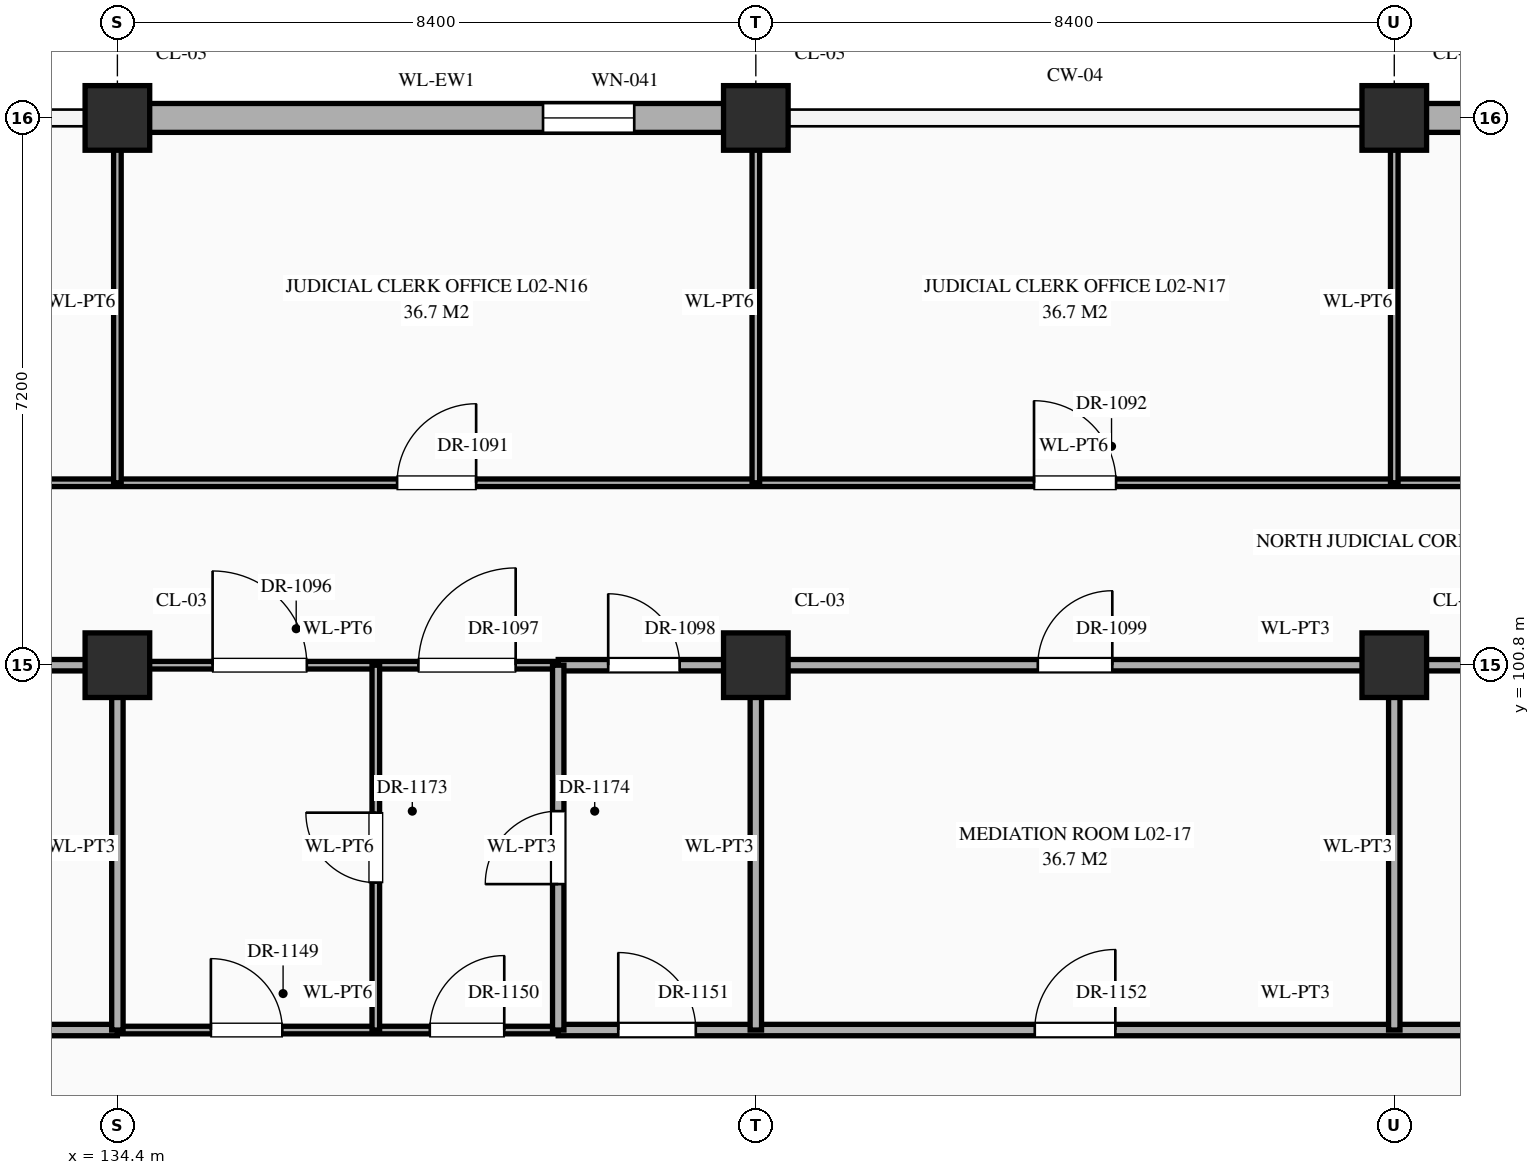
"""IFC4 building model, lengths in metres.
Left out: names, types, materials, properties, quantities, classifications, styles, units other than length and angle.
Written with IfcOpenShell. Run it as: python <this file> out.ifc"""

import sys

from ifc_helpers import new_model, si_unit, direction, frame, frame_2d, origin, origin_2d, place, context, subcontext, project, spatial, rectangle, extrude, element, fill, save


model = new_model("IFC4")
c1 = context("Model", 3, precision=1e-05, world=origin(), true_north=direction((0.0, 1.0)))
c2 = subcontext(c1, "Body", "Model", "MODEL_VIEW")
j1 = project(units=[si_unit("LENGTHUNIT", "METRE"), si_unit("PLANEANGLEUNIT", "RADIAN")], contexts=[c1])
p1 = place(None, origin())
s1 = spatial("IfcSite", under=j1, at=p1, CompositionType="ELEMENT")
p2 = place(p1, origin())
s2 = spatial("IfcBuilding", under=s1, at=p2, CompositionType="ELEMENT")
p3 = place(p2, frame((0.0, 0.0, 5.4)))
s3 = spatial("IfcBuildingStorey", under=s2, at=p3, CompositionType="ELEMENT", Elevation=5.4)
for number, where, z_axis, x_axis in (
    (1, (134.4, 100.8, 0.0), (0.0, 0.0, 1.0), (1.0, 0.0, 0.0)),
    (2, (134.4, 108.0, 0.0), (0.0, 0.0, 1.0), (1.0, 0.0, 0.0)),
    (3, (142.8, 100.8, 0.0), (0.0, 0.0, 1.0), (1.0, 0.0, 0.0)),
    (4, (142.8, 108.0, 0.0), (0.0, 0.0, 1.0), (1.0, 0.0, 0.0)),
    (5, (151.2, 100.8, 0.0), (0.0, 0.0, 1.0), (1.0, 0.0, 0.0)),
    (6, (151.2, 108.0, 0.0), (0.0, 0.0, 1.0), (1.0, 0.0, 0.0)),
):
    element("IfcColumn", number, at=place(p3, frame(where, z_axis=z_axis, x_axis=x_axis)), inside=s3, PredefinedType="COLUMN", context=c2, shape_type="SweptSolid", body=[
        extrude(rectangle(XDim=0.85, YDim=0.85, at=origin_2d()), origin(), (0.0, 0.0, 1.0), 5.4),
    ])
p4 = place(p3, frame((134.82, 108.0, 0.0), z_axis=(0.0, 0.0, 1.0), x_axis=(1.0, 0.0, 0.0)))
e7 = element("IfcWall", 7, at=p4, inside=s3, PredefinedType="STANDARD", context=c2, shape_type="SweptSolid", body=[
    extrude(rectangle(XDim=7.56, YDim=0.38, at=frame_2d((3.78, 0.0))), origin(), (0.0, 0.0, 1.0), 4.47),
])
p5 = place(p4, frame((5.18, 0.0, 0.85)))
e8 = element("IfcOpeningElement", 8, at=p5, cuts=e7, PredefinedType="OPENING", context=c2, shape_type="SweptSolid", body=[
    extrude(rectangle(XDim=1.2, YDim=1.56, at=frame_2d((0.6, 0.78))), frame((0.0, 0.202, 0.0), z_axis=(0.0, -1.0, 0.0), x_axis=(1.0, 0.0, 0.0)), (0.0, 0.0, 1.0), 0.404),
])
p6 = place(p3, frame((151.62, 108.0, 0.0), z_axis=(0.0, 0.0, 1.0), x_axis=(1.0, 0.0, 0.0)))
e9 = element("IfcWall", 9, at=p6, inside=s3, PredefinedType="STANDARD", context=c2, shape_type="SweptSolid", body=[
    extrude(rectangle(XDim=7.56, YDim=0.38, at=frame_2d((3.78, 0.0))), origin(), (0.0, 0.0, 1.0), 4.47),
])
p7 = place(p6, frame((5.18, 0.0, 0.85)))
e10 = element("IfcOpeningElement", 10, at=p7, cuts=e9, PredefinedType="OPENING", context=c2, shape_type="SweptSolid", body=[
    extrude(rectangle(XDim=1.2, YDim=1.92, at=frame_2d((0.6, 0.96))), frame((0.0, 0.202, 0.0), z_axis=(0.0, -1.0, 0.0), x_axis=(1.0, 0.0, 0.0)), (0.0, 0.0, 1.0), 0.404),
])
p8 = place(p3, frame((115.0, 96.0, 0.0), z_axis=(0.0, 0.0, 1.0), x_axis=(1.0, 0.0, 0.0)))
e11 = element("IfcWall", 11, at=p8, inside=s3, PredefinedType="STANDARD", context=c2, shape_type="SweptSolid", body=[
    extrude(rectangle(XDim=19.4, YDim=0.15, at=frame_2d((9.7, 0.0))), origin(), (0.0, 0.0, 1.0), 5.12),
])
p9 = place(p8, frame((0.82, 0.0, 0.0)))
e12 = element("IfcOpeningElement", 12, at=p9, cuts=e11, PredefinedType="OPENING", context=c2, shape_type="SweptSolid", body=[
    extrude(rectangle(XDim=0.96, YDim=2.2, at=frame_2d((0.48, 1.1))), frame((0.0, 0.087, 0.0), z_axis=(0.0, -1.0, 0.0), x_axis=(1.0, 0.0, 0.0)), (0.0, 0.0, 1.0), 0.174),
])
p10 = place(p8, frame((6.18, 0.0, 0.0)))
e13 = element("IfcOpeningElement", 13, at=p10, cuts=e11, PredefinedType="OPENING", context=c2, shape_type="SweptSolid", body=[
    extrude(rectangle(XDim=1.24, YDim=2.3, at=frame_2d((0.62, 1.15))), frame((0.0, 0.087, 0.0), z_axis=(0.0, -1.0, 0.0), x_axis=(1.0, 0.0, 0.0)), (0.0, 0.0, 1.0), 0.174),
])
p11 = place(p8, frame((14.56, 0.0, 0.0)))
e14 = element("IfcOpeningElement", 14, at=p11, cuts=e11, PredefinedType="OPENING", context=c2, shape_type="SweptSolid", body=[
    extrude(rectangle(XDim=1.28, YDim=2.35, at=frame_2d((0.64, 1.175))), frame((0.0, 0.087, 0.0), z_axis=(0.0, -1.0, 0.0), x_axis=(1.0, 0.0, 0.0)), (0.0, 0.0, 1.0), 0.174),
])
p12 = place(p3, frame((134.4, 96.0, 0.0), z_axis=(0.0, 0.0, 1.0), x_axis=(1.0, 0.0, 0.0)))
e15 = element("IfcWall", 15, at=p12, inside=s3, PredefinedType="STANDARD", context=c2, shape_type="SweptSolid", body=[
    extrude(rectangle(XDim=5.8, YDim=0.1, at=frame_2d((2.9, 0.0))), origin(), (0.0, 0.0, 1.0), 5.12),
])
p13 = place(p12, frame((1.23, 0.0, 0.0)))
e16 = element("IfcOpeningElement", 16, at=p13, cuts=e15, PredefinedType="OPENING", context=c2, shape_type="SweptSolid", body=[
    extrude(rectangle(XDim=0.94, YDim=2.3, at=frame_2d((0.47, 1.15))), frame((0.0, 0.062, 0.0), z_axis=(0.0, -1.0, 0.0), x_axis=(1.0, 0.0, 0.0)), (0.0, 0.0, 1.0), 0.124),
])
p14 = place(p12, frame((4.11, 0.0, 0.0)))
e17 = element("IfcOpeningElement", 17, at=p14, cuts=e15, PredefinedType="OPENING", context=c2, shape_type="SweptSolid", body=[
    extrude(rectangle(XDim=0.98, YDim=2.35, at=frame_2d((0.49, 1.175))), frame((0.0, 0.062, 0.0), z_axis=(0.0, -1.0, 0.0), x_axis=(1.0, 0.0, 0.0)), (0.0, 0.0, 1.0), 0.124),
])
p15 = place(p3, frame((140.2, 96.0, 0.0), z_axis=(0.0, 0.0, 1.0), x_axis=(1.0, 0.0, 0.0)))
e18 = element("IfcWall", 18, at=p15, inside=s3, PredefinedType="STANDARD", context=c2, shape_type="SweptSolid", body=[
    extrude(rectangle(XDim=19.4, YDim=0.15, at=frame_2d((9.7, 0.0))), origin(), (0.0, 0.0, 1.0), 5.12),
])
p16 = place(p15, frame((0.79, 0.0, 0.0)))
e19 = element("IfcOpeningElement", 19, at=p16, cuts=e18, PredefinedType="OPENING", context=c2, shape_type="SweptSolid", body=[
    extrude(rectangle(XDim=1.02, YDim=2.4, at=frame_2d((0.51, 1.2))), frame((0.0, 0.087, 0.0), z_axis=(0.0, -1.0, 0.0), x_axis=(1.0, 0.0, 0.0)), (0.0, 0.0, 1.0), 0.174),
])
p17 = place(p15, frame((6.27, 0.0, 0.0)))
e20 = element("IfcOpeningElement", 20, at=p17, cuts=e18, PredefinedType="OPENING", context=c2, shape_type="SweptSolid", body=[
    extrude(rectangle(XDim=1.06, YDim=2.4, at=frame_2d((0.53, 1.2))), frame((0.0, 0.087, 0.0), z_axis=(0.0, -1.0, 0.0), x_axis=(1.0, 0.0, 0.0)), (0.0, 0.0, 1.0), 0.174),
])
p18 = place(p15, frame((14.63, 0.0, 0.0)))
e21 = element("IfcOpeningElement", 21, at=p18, cuts=e18, PredefinedType="OPENING", context=c2, shape_type="SweptSolid", body=[
    extrude(rectangle(XDim=1.14, YDim=2.4, at=frame_2d((0.57, 1.2))), frame((0.0, 0.087, 0.0), z_axis=(0.0, -1.0, 0.0), x_axis=(1.0, 0.0, 0.0)), (0.0, 0.0, 1.0), 0.174),
])
p19 = place(p3, frame((126.0, 100.8, 0.0), z_axis=(0.0, 0.0, 1.0), x_axis=(1.0, 0.0, 0.0)))
e22 = element("IfcWall", 22, at=p19, inside=s3, PredefinedType="STANDARD", context=c2, shape_type="SweptSolid", body=[
    extrude(rectangle(XDim=8.4, YDim=0.15, at=frame_2d((4.2, 0.0))), origin(), (0.0, 0.0, 1.0), 4.27),
])
p20 = place(p19, frame((3.6, 0.0, 0.0)))
e23 = element("IfcOpeningElement", 23, at=p20, cuts=e22, PredefinedType="OPENING", context=c2, shape_type="SweptSolid", body=[
    extrude(rectangle(XDim=1.2, YDim=2.35, at=frame_2d((0.6, 1.175))), frame((0.0, 0.087, 0.0), z_axis=(0.0, -1.0, 0.0), x_axis=(1.0, 0.0, 0.0)), (0.0, 0.0, 1.0), 0.174),
])
p21 = place(p3, frame((134.4, 100.8, 0.0), z_axis=(0.0, 0.0, 1.0), x_axis=(1.0, 0.0, 0.0)))
e24 = element("IfcWall", 24, at=p21, inside=s3, PredefinedType="STANDARD", context=c2, shape_type="SweptSolid", body=[
    extrude(rectangle(XDim=5.8, YDim=0.1, at=frame_2d((2.9, 0.0))), origin(), (0.0, 0.0, 1.0), 4.27),
])
p22 = place(p21, frame((1.252, 0.0, 0.0)))
e25 = element("IfcOpeningElement", 25, at=p22, cuts=e24, PredefinedType="OPENING", context=c2, shape_type="SweptSolid", body=[
    extrude(rectangle(XDim=1.24, YDim=2.3, at=frame_2d((0.62, 1.15))), frame((0.0, 0.062, 0.0), z_axis=(0.0, -1.0, 0.0), x_axis=(1.0, 0.0, 0.0)), (0.0, 0.0, 1.0), 0.124),
])
p23 = place(p21, frame((3.96, 0.0, 0.0)))
e26 = element("IfcOpeningElement", 26, at=p23, cuts=e24, PredefinedType="OPENING", context=c2, shape_type="SweptSolid", body=[
    extrude(rectangle(XDim=1.28, YDim=2.35, at=frame_2d((0.64, 1.175))), frame((0.0, 0.062, 0.0), z_axis=(0.0, -1.0, 0.0), x_axis=(1.0, 0.0, 0.0)), (0.0, 0.0, 1.0), 0.124),
])
p24 = place(p3, frame((140.2, 100.8, 0.0), z_axis=(0.0, 0.0, 1.0), x_axis=(1.0, 0.0, 0.0)))
e27 = element("IfcWall", 27, at=p24, inside=s3, PredefinedType="STANDARD", context=c2, shape_type="SweptSolid", body=[
    extrude(rectangle(XDim=19.4, YDim=0.15, at=frame_2d((9.7, 0.0))), origin(), (0.0, 0.0, 1.0), 4.27),
])
p25 = place(p24, frame((0.657, 0.0, 0.0)))
e28 = element("IfcOpeningElement", 28, at=p25, cuts=e27, PredefinedType="OPENING", context=c2, shape_type="SweptSolid", body=[
    extrude(rectangle(XDim=0.94, YDim=2.3, at=frame_2d((0.47, 1.15))), frame((0.0, 0.087, 0.0), z_axis=(0.0, -1.0, 0.0), x_axis=(1.0, 0.0, 0.0)), (0.0, 0.0, 1.0), 0.174),
])
p26 = place(p24, frame((6.31, 0.0, 0.0)))
e29 = element("IfcOpeningElement", 29, at=p26, cuts=e27, PredefinedType="OPENING", context=c2, shape_type="SweptSolid", body=[
    extrude(rectangle(XDim=0.98, YDim=2.35, at=frame_2d((0.49, 1.175))), frame((0.0, 0.087, 0.0), z_axis=(0.0, -1.0, 0.0), x_axis=(1.0, 0.0, 0.0)), (0.0, 0.0, 1.0), 0.174),
])
p27 = place(p24, frame((14.69, 0.0, 0.0)))
e30 = element("IfcOpeningElement", 30, at=p27, cuts=e27, PredefinedType="OPENING", context=c2, shape_type="SweptSolid", body=[
    extrude(rectangle(XDim=1.02, YDim=2.4, at=frame_2d((0.51, 1.2))), frame((0.0, 0.087, 0.0), z_axis=(0.0, -1.0, 0.0), x_axis=(1.0, 0.0, 0.0)), (0.0, 0.0, 1.0), 0.174),
])
p28 = place(p3, frame((126.0, 103.2, 0.0), z_axis=(0.0, 0.0, 1.0), x_axis=(1.0, 0.0, 0.0)))
e31 = element("IfcWall", 31, at=p28, inside=s3, PredefinedType="STANDARD", context=c2, shape_type="SweptSolid", body=[
    extrude(rectangle(XDim=41.96, YDim=0.1, at=frame_2d((20.98, 0.0))), origin(), (0.0, 0.0, 1.0), 5.12),
])
p29 = place(p28, frame((3.7, 0.0, 0.0)))
e32 = element("IfcOpeningElement", 32, at=p29, cuts=e31, PredefinedType="OPENING", context=c2, shape_type="SweptSolid", body=[
    extrude(rectangle(XDim=1.0, YDim=2.25, at=frame_2d((0.5, 1.125))), frame((0.0, 0.062, 0.0), z_axis=(0.0, -1.0, 0.0), x_axis=(1.0, 0.0, 0.0)), (0.0, 0.0, 1.0), 0.124),
])
p30 = place(p28, frame((12.08, 0.0, 0.0)))
e33 = element("IfcOpeningElement", 33, at=p30, cuts=e31, PredefinedType="OPENING", context=c2, shape_type="SweptSolid", body=[
    extrude(rectangle(XDim=1.04, YDim=2.2, at=frame_2d((0.52, 1.1))), frame((0.0, 0.062, 0.0), z_axis=(0.0, -1.0, 0.0), x_axis=(1.0, 0.0, 0.0)), (0.0, 0.0, 1.0), 0.124),
])
p31 = place(p28, frame((20.46, 0.0, 0.0)))
e34 = element("IfcOpeningElement", 34, at=p31, cuts=e31, PredefinedType="OPENING", context=c2, shape_type="SweptSolid", body=[
    extrude(rectangle(XDim=1.08, YDim=2.25, at=frame_2d((0.54, 1.125))), frame((0.0, 0.062, 0.0), z_axis=(0.0, -1.0, 0.0), x_axis=(1.0, 0.0, 0.0)), (0.0, 0.0, 1.0), 0.124),
])
p32 = place(p28, frame((28.84, 0.0, 0.0)))
e35 = element("IfcOpeningElement", 35, at=p32, cuts=e31, PredefinedType="OPENING", context=c2, shape_type="SweptSolid", body=[
    extrude(rectangle(XDim=1.12, YDim=2.25, at=frame_2d((0.56, 1.125))), frame((0.0, 0.062, 0.0), z_axis=(0.0, -1.0, 0.0), x_axis=(1.0, 0.0, 0.0)), (0.0, 0.0, 1.0), 0.124),
])
p33 = place(p28, frame((37.2, 0.0, 0.0)))
e36 = element("IfcOpeningElement", 36, at=p33, cuts=e31, PredefinedType="OPENING", context=c2, shape_type="SweptSolid", body=[
    extrude(rectangle(XDim=1.16, YDim=2.3, at=frame_2d((0.58, 1.15))), frame((0.0, 0.062, 0.0), z_axis=(0.0, -1.0, 0.0), x_axis=(1.0, 0.0, 0.0)), (0.0, 0.0, 1.0), 0.124),
])
p34 = place(p3, frame((134.4, 96.0, 0.0), z_axis=(0.0, 0.0, 1.0), x_axis=(0.0, 1.0, 0.0)))
e37 = element("IfcWall", 37, at=p34, inside=s3, PredefinedType="STANDARD", context=c2, shape_type="SweptSolid", body=[
    extrude(rectangle(XDim=4.8, YDim=0.15, at=frame_2d((2.4, 0.0))), origin(), (0.0, 0.0, 1.0), 4.37),
])
p35 = place(p3, frame((134.4, 103.2, 0.0), z_axis=(0.0, 0.0, 1.0), x_axis=(0.0, 1.0, 0.0)))
e38 = element("IfcWall", 38, at=p35, inside=s3, PredefinedType="STANDARD", context=c2, shape_type="SweptSolid", body=[
    extrude(rectangle(XDim=4.76, YDim=0.1, at=frame_2d((2.38, 0.0))), origin(), (0.0, 0.0, 1.0), 4.37),
])
p36 = place(p3, frame((137.8, 96.0, 0.0), z_axis=(0.0, 0.0, 1.0), x_axis=(0.0, 1.0, 0.0)))
e39 = element("IfcWall", 39, at=p36, inside=s3, PredefinedType="STANDARD", context=c2, shape_type="SweptSolid", body=[
    extrude(rectangle(XDim=4.8, YDim=0.1, at=frame_2d((2.4, 0.0))), origin(), (0.0, 0.0, 1.0), 5.12),
])
p37 = place(p36, frame((1.94, 0.0, 0.0)))
e40 = element("IfcOpeningElement", 40, at=p37, cuts=e39, PredefinedType="OPENING", context=c2, shape_type="SweptSolid", body=[
    extrude(rectangle(XDim=0.92, YDim=2.15, at=frame_2d((0.46, 1.075))), frame((0.0, 0.062, 0.0), z_axis=(0.0, -1.0, 0.0), x_axis=(1.0, 0.0, 0.0)), (0.0, 0.0, 1.0), 0.124),
])
p38 = place(p3, frame((140.2, 96.0, 0.0), z_axis=(0.0, 0.0, 1.0), x_axis=(0.0, 1.0, 0.0)))
e41 = element("IfcWall", 41, at=p38, inside=s3, PredefinedType="STANDARD", context=c2, shape_type="SweptSolid", body=[
    extrude(rectangle(XDim=4.8, YDim=0.15, at=frame_2d((2.4, 0.0))), origin(), (0.0, 0.0, 1.0), 5.12),
])
p39 = place(p38, frame((1.92, 0.0, 0.0)))
e42 = element("IfcOpeningElement", 42, at=p39, cuts=e41, PredefinedType="OPENING", context=c2, shape_type="SweptSolid", body=[
    extrude(rectangle(XDim=0.96, YDim=2.2, at=frame_2d((0.48, 1.1))), frame((0.0, 0.087, 0.0), z_axis=(0.0, -1.0, 0.0), x_axis=(1.0, 0.0, 0.0)), (0.0, 0.0, 1.0), 0.174),
])
p40 = place(p3, frame((142.8, 96.0, 0.0), z_axis=(0.0, 0.0, 1.0), x_axis=(0.0, 1.0, 0.0)))
e43 = element("IfcWall", 43, at=p40, inside=s3, PredefinedType="STANDARD", context=c2, shape_type="SweptSolid", body=[
    extrude(rectangle(XDim=4.8, YDim=0.15, at=frame_2d((2.4, 0.0))), origin(), (0.0, 0.0, 1.0), 4.37),
])
p41 = place(p3, frame((142.8, 103.2, 0.0), z_axis=(0.0, 0.0, 1.0), x_axis=(0.0, 1.0, 0.0)))
e44 = element("IfcWall", 44, at=p41, inside=s3, PredefinedType="STANDARD", context=c2, shape_type="SweptSolid", body=[
    extrude(rectangle(XDim=4.76, YDim=0.1, at=frame_2d((2.38, 0.0))), origin(), (0.0, 0.0, 1.0), 4.37),
])
p42 = place(p3, frame((151.2, 96.0, 0.0), z_axis=(0.0, 0.0, 1.0), x_axis=(0.0, 1.0, 0.0)))
e45 = element("IfcWall", 45, at=p42, inside=s3, PredefinedType="STANDARD", context=c2, shape_type="SweptSolid", body=[
    extrude(rectangle(XDim=4.8, YDim=0.15, at=frame_2d((2.4, 0.0))), origin(), (0.0, 0.0, 1.0), 4.37),
])
p43 = place(p3, frame((151.2, 103.2, 0.0), z_axis=(0.0, 0.0, 1.0), x_axis=(0.0, 1.0, 0.0)))
e46 = element("IfcWall", 46, at=p43, inside=s3, PredefinedType="STANDARD", context=c2, shape_type="SweptSolid", body=[
    extrude(rectangle(XDim=4.76, YDim=0.1, at=frame_2d((2.38, 0.0))), origin(), (0.0, 0.0, 1.0), 4.37),
])
p44 = place(p5, origin())
e47 = element("IfcWindow", 47, at=p44, inside=s3, PartitioningType="SINGLE_PANEL", PredefinedType="WINDOW", context=c2, shape_type="SweptSolid", body=[
    extrude(rectangle(XDim=1.2, YDim=1.56, at=frame_2d((0.6, 0.78))), frame((0.0, 0.03, 0.0), z_axis=(0.0, -1.0, 0.0), x_axis=(1.0, 0.0, 0.0)), (0.0, 0.0, 1.0), 0.06),
])
fill(e8, e47)
p45 = place(p30, origin())
e48 = element("IfcDoor", 48, at=p45, inside=s3, OperationType="SINGLE_SWING_RIGHT", PredefinedType="DOOR", context=c2, shape_type="SweptSolid", body=[
    extrude(rectangle(XDim=1.04, YDim=2.2, at=frame_2d((0.52, 1.1))), frame((0.0, 0.025, 0.0), z_axis=(0.0, -1.0, 0.0), x_axis=(1.0, 0.0, 0.0)), (0.0, 0.0, 1.0), 0.05),
])
fill(e33, e48)
p46 = place(p31, origin())
e49 = element("IfcDoor", 49, at=p46, inside=s3, OperationType="SINGLE_SWING_LEFT", PredefinedType="DOOR", context=c2, shape_type="SweptSolid", body=[
    extrude(rectangle(XDim=1.08, YDim=2.25, at=frame_2d((0.54, 1.125))), frame((0.0, 0.025, 0.0), z_axis=(0.0, -1.0, 0.0), x_axis=(1.0, 0.0, 0.0)), (0.0, 0.0, 1.0), 0.05),
])
fill(e34, e49)
p47 = place(p22, origin())
e50 = element("IfcDoor", 50, at=p47, inside=s3, OperationType="SINGLE_SWING_LEFT", PredefinedType="DOOR", context=c2, shape_type="SweptSolid", body=[
    extrude(rectangle(XDim=1.24, YDim=2.3, at=frame_2d((0.62, 1.15))), frame((0.0, 0.025, 0.0), z_axis=(0.0, -1.0, 0.0), x_axis=(1.0, 0.0, 0.0)), (0.0, 0.0, 1.0), 0.05),
])
fill(e25, e50)
p48 = place(p23, origin())
e51 = element("IfcDoor", 51, at=p48, inside=s3, OperationType="SINGLE_SWING_RIGHT", PredefinedType="DOOR", context=c2, shape_type="SweptSolid", body=[
    extrude(rectangle(XDim=1.28, YDim=2.35, at=frame_2d((0.64, 1.175))), frame((0.0, 0.025, 0.0), z_axis=(0.0, -1.0, 0.0), x_axis=(1.0, 0.0, 0.0)), (0.0, 0.0, 1.0), 0.05),
])
fill(e26, e51)
p49 = place(p25, origin())
e52 = element("IfcDoor", 52, at=p49, inside=s3, OperationType="SINGLE_SWING_LEFT", PredefinedType="DOOR", context=c2, shape_type="SweptSolid", body=[
    extrude(rectangle(XDim=0.94, YDim=2.3, at=frame_2d((0.47, 1.15))), frame((0.0, 0.025, 0.0), z_axis=(0.0, -1.0, 0.0), x_axis=(1.0, 0.0, 0.0)), (0.0, 0.0, 1.0), 0.05),
])
fill(e28, e52)
p50 = place(p26, origin())
e53 = element("IfcDoor", 53, at=p50, inside=s3, OperationType="SINGLE_SWING_RIGHT", PredefinedType="DOOR", context=c2, shape_type="SweptSolid", body=[
    extrude(rectangle(XDim=0.98, YDim=2.35, at=frame_2d((0.49, 1.175))), frame((0.0, 0.025, 0.0), z_axis=(0.0, -1.0, 0.0), x_axis=(1.0, 0.0, 0.0)), (0.0, 0.0, 1.0), 0.05),
])
fill(e29, e53)
p51 = place(p13, origin())
e54 = element("IfcDoor", 54, at=p51, inside=s3, OperationType="SINGLE_SWING_LEFT", PredefinedType="DOOR", context=c2, shape_type="SweptSolid", body=[
    extrude(rectangle(XDim=0.94, YDim=2.3, at=frame_2d((0.47, 1.15))), frame((0.0, 0.025, 0.0), z_axis=(0.0, -1.0, 0.0), x_axis=(1.0, 0.0, 0.0)), (0.0, 0.0, 1.0), 0.05),
])
fill(e16, e54)
p52 = place(p14, origin())
e55 = element("IfcDoor", 55, at=p52, inside=s3, OperationType="SINGLE_SWING_RIGHT", PredefinedType="DOOR", context=c2, shape_type="SweptSolid", body=[
    extrude(rectangle(XDim=0.98, YDim=2.35, at=frame_2d((0.49, 1.175))), frame((0.0, 0.025, 0.0), z_axis=(0.0, -1.0, 0.0), x_axis=(1.0, 0.0, 0.0)), (0.0, 0.0, 1.0), 0.05),
])
fill(e17, e55)
p53 = place(p16, origin())
e56 = element("IfcDoor", 56, at=p53, inside=s3, OperationType="SINGLE_SWING_LEFT", PredefinedType="DOOR", context=c2, shape_type="SweptSolid", body=[
    extrude(rectangle(XDim=1.02, YDim=2.4, at=frame_2d((0.51, 1.2))), frame((0.0, 0.025, 0.0), z_axis=(0.0, -1.0, 0.0), x_axis=(1.0, 0.0, 0.0)), (0.0, 0.0, 1.0), 0.05),
])
fill(e19, e56)
p54 = place(p17, origin())
e57 = element("IfcDoor", 57, at=p54, inside=s3, OperationType="SINGLE_SWING_RIGHT", PredefinedType="DOOR", context=c2, shape_type="SweptSolid", body=[
    extrude(rectangle(XDim=1.06, YDim=2.4, at=frame_2d((0.53, 1.2))), frame((0.0, 0.025, 0.0), z_axis=(0.0, -1.0, 0.0), x_axis=(1.0, 0.0, 0.0)), (0.0, 0.0, 1.0), 0.05),
])
fill(e20, e57)
p55 = place(p37, origin())
e58 = element("IfcDoor", 58, at=p55, inside=s3, OperationType="SINGLE_SWING_RIGHT", PredefinedType="DOOR", context=c2, shape_type="SweptSolid", body=[
    extrude(rectangle(XDim=0.92, YDim=2.15, at=frame_2d((0.46, 1.075))), frame((0.0, 0.025, 0.0), z_axis=(0.0, -1.0, 0.0), x_axis=(1.0, 0.0, 0.0)), (0.0, 0.0, 1.0), 0.05),
])
fill(e40, e58)
p56 = place(p39, origin())
e59 = element("IfcDoor", 59, at=p56, inside=s3, OperationType="SINGLE_SWING_LEFT", PredefinedType="DOOR", context=c2, shape_type="SweptSolid", body=[
    extrude(rectangle(XDim=0.96, YDim=2.2, at=frame_2d((0.48, 1.1))), frame((0.0, 0.025, 0.0), z_axis=(0.0, -1.0, 0.0), x_axis=(1.0, 0.0, 0.0)), (0.0, 0.0, 1.0), 0.05),
])
fill(e42, e59)
save(model, sys.argv[1])
